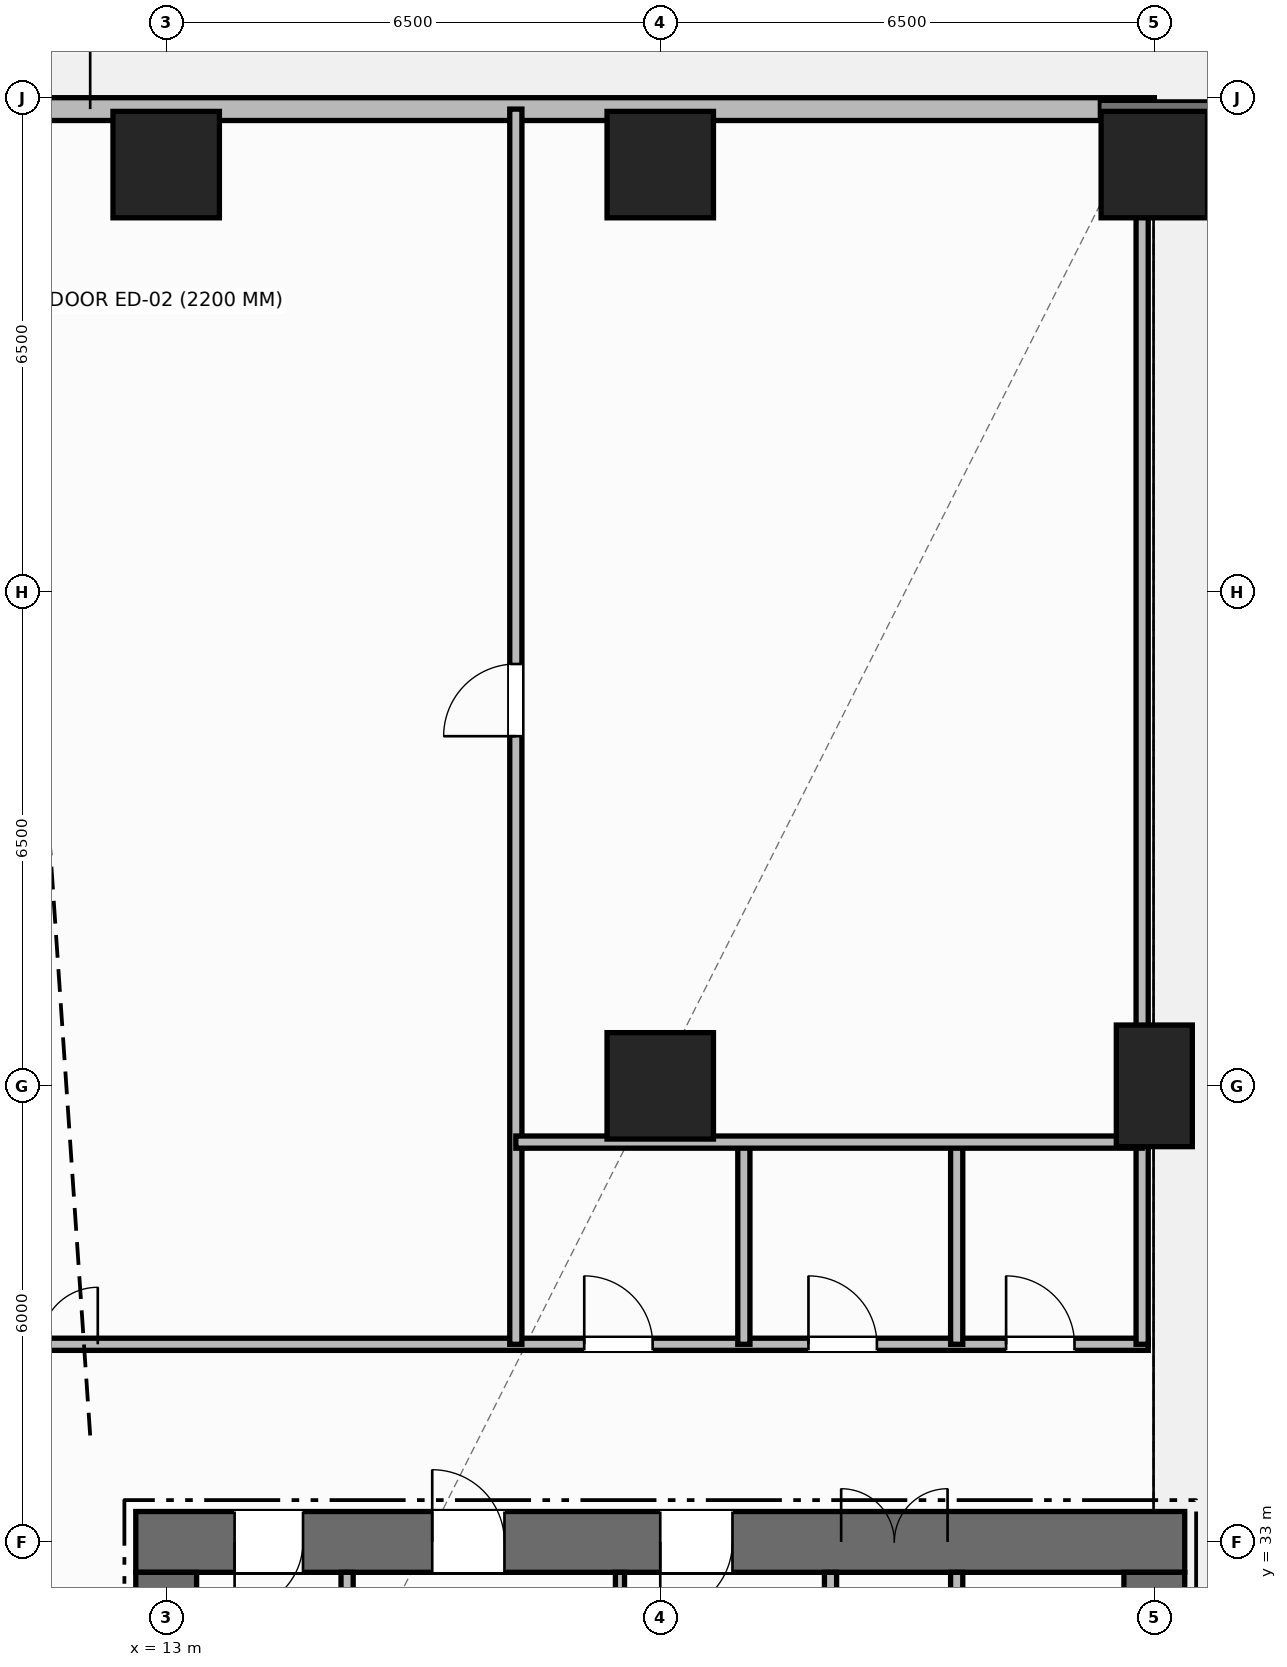
"""IFC4 building model, lengths in metres.
Left out: names, types, materials, properties, quantities, classifications, styles, units other than length and angle.
Written with IfcOpenShell. Run it as: python <this file> out.ifc"""

import sys

from ifc_helpers import new_model, si_unit, direction, frame, frame_2d, origin, origin_2d, place, context, subcontext, project, spatial, rectangle, extrude, element, fill, save


model = new_model("IFC4")
c1 = context("Model", 3, precision=1e-05, world=origin(), true_north=direction((0.0, 1.0)))
c2 = subcontext(c1, "Body", "Model", "MODEL_VIEW")
j1 = project(units=[si_unit("LENGTHUNIT", "METRE"), si_unit("PLANEANGLEUNIT", "RADIAN")], contexts=[c1])
p1 = place(None, origin())
s1 = spatial("IfcSite", under=j1, at=p1, CompositionType="ELEMENT")
p2 = place(p1, origin())
s2 = spatial("IfcBuilding", under=s1, at=p2, CompositionType="ELEMENT")
p3 = place(p2, origin())
s3 = spatial("IfcBuildingStorey", under=s2, at=p3, CompositionType="ELEMENT", Elevation=0.0)
p4 = place(p3, frame((12.6, 33.0, 0.0), z_axis=(0.0, 0.0, 1.0), x_axis=(1.0, 0.0, 0.0)))
e1 = element("IfcWall", 1, at=p4, inside=s3, PredefinedType="SHEAR", context=c2, shape_type="SweptSolid", body=[
    extrude(rectangle(XDim=13.8, YDim=0.8, at=frame_2d((6.9, 0.0))), origin(), (0.0, 0.0, 1.0), 6.0),
])
p5 = place(p4, frame((1.3, 0.0, 0.0)))
e2 = element("IfcOpeningElement", 2, at=p5, cuts=e1, PredefinedType="OPENING", context=c2, shape_type="SweptSolid", body=[
    extrude(rectangle(XDim=0.9, YDim=2.15, at=frame_2d((0.45, 1.075))), frame((0.0, 0.41, 0.0), z_axis=(0.0, -1.0, 0.0), x_axis=(1.0, 0.0, 0.0)), (0.0, 0.0, 1.0), 0.82),
])
p6 = place(p4, frame((3.9, 0.0, 0.0)))
e3 = element("IfcOpeningElement", 3, at=p6, cuts=e1, PredefinedType="OPENING", context=c2, shape_type="SweptSolid", body=[
    extrude(rectangle(XDim=0.95, YDim=2.15, at=frame_2d((0.475, 1.075))), frame((0.0, 0.41, 0.0), z_axis=(0.0, -1.0, 0.0), x_axis=(1.0, 0.0, 0.0)), (0.0, 0.0, 1.0), 0.82),
])
p7 = place(p4, frame((6.9, 0.0, 0.0)))
e4 = element("IfcOpeningElement", 4, at=p7, cuts=e1, PredefinedType="OPENING", context=c2, shape_type="SweptSolid", body=[
    extrude(rectangle(XDim=0.95, YDim=2.15, at=frame_2d((0.475, 1.075))), frame((0.0, 0.41, 0.0), z_axis=(0.0, -1.0, 0.0), x_axis=(1.0, 0.0, 0.0)), (0.0, 0.0, 1.0), 0.82),
])
p8 = place(p4, frame((9.28, 0.0, 0.0)))
e5 = element("IfcOpeningElement", 5, at=p8, cuts=e1, PredefinedType="OPENING", context=c2, shape_type="SweptSolid", body=[
    extrude(rectangle(XDim=1.4, YDim=2.2, at=frame_2d((0.7, 1.1))), frame((0.0, 0.41, 0.0), z_axis=(0.0, -1.0, 0.0), x_axis=(1.0, 0.0, 0.0)), (0.0, 0.0, 1.0), 0.82),
])
p9 = place(p3, frame((13.0, 19.4, 0.0), z_axis=(0.0, 0.0, 1.0), x_axis=(0.0, 1.0, 0.0)))
e6 = element("IfcWall", 6, at=p9, inside=s3, PredefinedType="SHEAR", context=c2, shape_type="SweptSolid", body=[
    extrude(rectangle(XDim=13.2, YDim=0.8, at=frame_2d((6.6, 0.0))), origin(), (0.0, 0.0, 1.0), 6.0),
])
p10 = place(p9, frame((4.65, 0.0, 0.0)))
e7 = element("IfcOpeningElement", 7, at=p10, cuts=e6, PredefinedType="OPENING", context=c2, shape_type="SweptSolid", body=[
    extrude(rectangle(XDim=1.4, YDim=2.2, at=frame_2d((0.7, 1.1))), frame((0.0, 0.41, 0.0), z_axis=(0.0, -1.0, 0.0), x_axis=(1.0, 0.0, 0.0)), (0.0, 0.0, 1.0), 0.82),
])
p11 = place(p3, frame((26.0, 19.4, 0.0), z_axis=(0.0, 0.0, 1.0), x_axis=(0.0, 1.0, 0.0)))
e8 = element("IfcWall", 8, at=p11, inside=s3, PredefinedType="SHEAR", context=c2, shape_type="SweptSolid", body=[
    extrude(rectangle(XDim=13.2, YDim=0.8, at=frame_2d((6.6, 0.0))), origin(), (0.0, 0.0, 1.0), 6.0),
])
p12 = place(p3, frame((19.5, 39.0, 0.0), z_axis=(0.0, 0.0, 1.0), x_axis=(1.0, 0.0, 0.0)))
e9 = element("IfcColumn", 9, at=p12, inside=s3, PredefinedType="COLUMN", context=c2, shape_type="SweptSolid", body=[
    extrude(rectangle(XDim=1.4, YDim=1.4, at=origin_2d()), origin(), (0.0, 0.0, 1.0), 6.0),
])
p13 = place(p3, frame((26.0, 39.0, 0.0), z_axis=(0.0, 0.0, 1.0), x_axis=(1.0, 0.0, 0.0)))
e10 = element("IfcColumn", 10, at=p13, inside=s3, PredefinedType="PILASTER", context=c2, shape_type="SweptSolid", body=[
    extrude(rectangle(XDim=1.0, YDim=1.6, at=origin_2d()), origin(), (0.0, 0.0, 1.0), 6.0),
])
for number, where, z_axis, x_axis in (
    (11, (13.0, 51.12, 0.0), (0.0, 0.0, 1.0), (1.0, 0.0, 0.0)),
    (12, (19.5, 51.12, 0.0), (0.0, 0.0, 1.0), (1.0, 0.0, 0.0)),
    (13, (26.0, 51.12, 0.0), (0.0, 0.0, 1.0), (1.0, 0.0, 0.0)),
):
    element("IfcColumn", number, at=place(p3, frame(where, z_axis=z_axis, x_axis=x_axis)), inside=s3, PredefinedType="COLUMN", context=c2, shape_type="SweptSolid", body=[
        extrude(rectangle(XDim=1.4, YDim=1.4, at=origin_2d()), origin(), (0.0, 0.0, 1.0), 6.0),
    ])
p14 = place(p3, frame((3.0, 51.85, 0.0), z_axis=(0.0, 0.0, 1.0), x_axis=(1.0, 0.0, 0.0)))
e14 = element("IfcWall", 14, at=p14, inside=s3, PredefinedType="STANDARD", context=c2, shape_type="SweptSolid", body=[
    extrude(rectangle(XDim=23.0, YDim=0.3, at=frame_2d((11.5, 0.0))), origin(), (0.0, 0.0, 1.0), 5.72),
])
p15 = place(p14, frame((6.8, 0.0, 0.0)))
e15 = element("IfcOpeningElement", 15, at=p15, cuts=e14, PredefinedType="OPENING", context=c2, shape_type="SweptSolid", body=[
    extrude(rectangle(XDim=2.2, YDim=2.4, at=frame_2d((1.1, 1.2))), frame((0.0, 0.16, 0.0), z_axis=(0.0, -1.0, 0.0), x_axis=(1.0, 0.0, 0.0)), (0.0, 0.0, 1.0), 0.32),
])
p16 = place(p3, frame((15.38, 26.56, 0.0), z_axis=(0.0, 0.0, 1.0), x_axis=(0.0, 1.0, 0.0)))
e16 = element("IfcWall", 16, at=p16, inside=s3, PredefinedType="STANDARD", context=c2, shape_type="SweptSolid", body=[
    extrude(rectangle(XDim=6.04, YDim=0.16, at=frame_2d((3.02, 0.0))), origin(), (0.0, 0.0, 1.0), 5.72),
])
p17 = place(p3, frame((18.97, 26.56, 0.0), z_axis=(0.0, 0.0, 1.0), x_axis=(0.0, 1.0, 0.0)))
e17 = element("IfcWall", 17, at=p17, inside=s3, PredefinedType="PARTITIONING", context=c2, shape_type="SweptSolid", body=[
    extrude(rectangle(XDim=6.04, YDim=0.12, at=frame_2d((3.02, 0.0))), origin(), (0.0, 0.0, 1.0), 5.72),
])
p18 = place(p3, frame((21.74, 26.56, 0.0), z_axis=(0.0, 0.0, 1.0), x_axis=(0.0, 1.0, 0.0)))
e18 = element("IfcWall", 18, at=p18, inside=s3, PredefinedType="STANDARD", context=c2, shape_type="SweptSolid", body=[
    extrude(rectangle(XDim=6.04, YDim=0.16, at=frame_2d((3.02, 0.0))), origin(), (0.0, 0.0, 1.0), 5.72),
])
p19 = place(p3, frame((23.4, 19.4, 0.0), z_axis=(0.0, 0.0, 1.0), x_axis=(0.0, 1.0, 0.0)))
e19 = element("IfcWall", 19, at=p19, inside=s3, PredefinedType="STANDARD", context=c2, shape_type="SweptSolid", body=[
    extrude(rectangle(XDim=13.2, YDim=0.16, at=frame_2d((6.6, 0.0))), origin(), (0.0, 0.0, 1.0), 5.72),
])
p20 = place(p19, frame((0.55, 0.0, 0.0)))
e20 = element("IfcOpeningElement", 20, at=p20, cuts=e19, PredefinedType="OPENING", context=c2, shape_type="SweptSolid", body=[
    extrude(rectangle(XDim=1.1, YDim=2.2, at=frame_2d((0.55, 1.1))), frame((0.0, 0.09, 0.0), z_axis=(0.0, -1.0, 0.0), x_axis=(1.0, 0.0, 0.0)), (0.0, 0.0, 1.0), 0.18),
])
p21 = place(p19, frame((2.7, 0.0, 0.0)))
e21 = element("IfcOpeningElement", 21, at=p21, cuts=e19, PredefinedType="OPENING", context=c2, shape_type="SweptSolid", body=[
    extrude(rectangle(XDim=1.1, YDim=2.2, at=frame_2d((0.55, 1.1))), frame((0.0, 0.09, 0.0), z_axis=(0.0, -1.0, 0.0), x_axis=(1.0, 0.0, 0.0)), (0.0, 0.0, 1.0), 0.18),
])
p22 = place(p19, frame((4.9, 0.0, 0.0)))
e22 = element("IfcOpeningElement", 22, at=p22, cuts=e19, PredefinedType="OPENING", context=c2, shape_type="SweptSolid", body=[
    extrude(rectangle(XDim=1.1, YDim=2.2, at=frame_2d((0.55, 1.1))), frame((0.0, 0.09, 0.0), z_axis=(0.0, -1.0, 0.0), x_axis=(1.0, 0.0, 0.0)), (0.0, 0.0, 1.0), 0.18),
])
p23 = place(p19, frame((7.05, 0.0, 0.0)))
e23 = element("IfcOpeningElement", 23, at=p23, cuts=e19, PredefinedType="OPENING", context=c2, shape_type="SweptSolid", body=[
    extrude(rectangle(XDim=1.1, YDim=2.2, at=frame_2d((0.55, 1.1))), frame((0.0, 0.09, 0.0), z_axis=(0.0, -1.0, 0.0), x_axis=(1.0, 0.0, 0.0)), (0.0, 0.0, 1.0), 0.18),
])
p24 = place(p19, frame((9.2, 0.0, 0.0)))
e24 = element("IfcOpeningElement", 24, at=p24, cuts=e19, PredefinedType="OPENING", context=c2, shape_type="SweptSolid", body=[
    extrude(rectangle(XDim=1.1, YDim=2.2, at=frame_2d((0.55, 1.1))), frame((0.0, 0.09, 0.0), z_axis=(0.0, -1.0, 0.0), x_axis=(1.0, 0.0, 0.0)), (0.0, 0.0, 1.0), 0.18),
])
p25 = place(p19, frame((11.4, 0.0, 0.0)))
e25 = element("IfcOpeningElement", 25, at=p25, cuts=e19, PredefinedType="OPENING", context=c2, shape_type="SweptSolid", body=[
    extrude(rectangle(XDim=1.1, YDim=2.2, at=frame_2d((0.55, 1.1))), frame((0.0, 0.09, 0.0), z_axis=(0.0, -1.0, 0.0), x_axis=(1.0, 0.0, 0.0)), (0.0, 0.0, 1.0), 0.18),
])
p26 = place(p3, frame((0.1, 35.6, 0.0), z_axis=(0.0, 0.0, 1.0), x_axis=(1.0, 0.0, 0.0)))
e26 = element("IfcWall", 26, at=p26, inside=s3, PredefinedType="STANDARD", context=c2, shape_type="SweptSolid", body=[
    extrude(rectangle(XDim=25.82, YDim=0.16, at=frame_2d((12.91, 0.0))), origin(), (0.0, 0.0, 1.0), 5.72),
])
p27 = place(p26, frame((10.5, 0.0, 0.0)))
e27 = element("IfcOpeningElement", 27, at=p27, cuts=e26, PredefinedType="OPENING", context=c2, shape_type="SweptSolid", body=[
    extrude(rectangle(XDim=1.5, YDim=2.2, at=frame_2d((0.75, 1.1))), frame((0.0, 0.09, 0.0), z_axis=(0.0, -1.0, 0.0), x_axis=(1.0, 0.0, 0.0)), (0.0, 0.0, 1.0), 0.18),
])
p28 = place(p26, frame((18.4, 0.0, 0.0)))
e28 = element("IfcOpeningElement", 28, at=p28, cuts=e26, PredefinedType="OPENING", context=c2, shape_type="SweptSolid", body=[
    extrude(rectangle(XDim=0.9, YDim=2.15, at=frame_2d((0.45, 1.075))), frame((0.0, 0.09, 0.0), z_axis=(0.0, -1.0, 0.0), x_axis=(1.0, 0.0, 0.0)), (0.0, 0.0, 1.0), 0.18),
])
p29 = place(p26, frame((21.35, 0.0, 0.0)))
e29 = element("IfcOpeningElement", 29, at=p29, cuts=e26, PredefinedType="OPENING", context=c2, shape_type="SweptSolid", body=[
    extrude(rectangle(XDim=0.9, YDim=2.15, at=frame_2d((0.45, 1.075))), frame((0.0, 0.09, 0.0), z_axis=(0.0, -1.0, 0.0), x_axis=(1.0, 0.0, 0.0)), (0.0, 0.0, 1.0), 0.18),
])
p30 = place(p26, frame((23.95, 0.0, 0.0)))
e30 = element("IfcOpeningElement", 30, at=p30, cuts=e26, PredefinedType="OPENING", context=c2, shape_type="SweptSolid", body=[
    extrude(rectangle(XDim=0.9, YDim=2.15, at=frame_2d((0.45, 1.075))), frame((0.0, 0.09, 0.0), z_axis=(0.0, -1.0, 0.0), x_axis=(1.0, 0.0, 0.0)), (0.0, 0.0, 1.0), 0.18),
])
p31 = place(p3, frame((25.84, 35.6, 0.0), z_axis=(0.0, 0.0, 1.0), x_axis=(0.0, 1.0, 0.0)))
e31 = element("IfcWall", 31, at=p31, inside=s3, PredefinedType="STANDARD", context=c2, shape_type="SweptSolid", body=[
    extrude(rectangle(XDim=16.25, YDim=0.16, at=frame_2d((8.125, 0.0))), origin(), (0.0, 0.0, 1.0), 4.92),
])
p32 = place(p3, frame((17.6, 35.6, 0.0), z_axis=(0.0, 0.0, 1.0), x_axis=(0.0, 1.0, 0.0)))
e32 = element("IfcWall", 32, at=p32, inside=s3, PredefinedType="STANDARD", context=c2, shape_type="SweptSolid", body=[
    extrude(rectangle(XDim=16.25, YDim=0.16, at=frame_2d((8.125, 0.0))), origin(), (0.0, 0.0, 1.0), 5.72),
])
p33 = place(p32, frame((8.0, 0.0, 0.0)))
e33 = element("IfcOpeningElement", 33, at=p33, cuts=e32, PredefinedType="OPENING", context=c2, shape_type="SweptSolid", body=[
    extrude(rectangle(XDim=0.95, YDim=2.15, at=frame_2d((0.475, 1.075))), frame((0.0, 0.09, 0.0), z_axis=(0.0, -1.0, 0.0), x_axis=(1.0, 0.0, 0.0)), (0.0, 0.0, 1.0), 0.18),
])
for number, where, z_axis, x_axis in (
    (34, (20.6, 35.6, 0.0), (0.0, 0.0, 1.0), (0.0, 1.0, 0.0)),
    (35, (23.4, 35.6, 0.0), (0.0, 0.0, 1.0), (0.0, 1.0, 0.0)),
):
    element("IfcWall", number, at=place(p3, frame(where, z_axis=z_axis, x_axis=x_axis)), inside=s3, PredefinedType="STANDARD", context=c2, shape_type="SweptSolid", body=[
        extrude(rectangle(XDim=2.66, YDim=0.16, at=frame_2d((1.33, 0.0))), origin(), (0.0, 0.0, 1.0), 5.72),
    ])
p34 = place(p3, frame((17.6, 38.26, 0.0), z_axis=(0.0, 0.0, 1.0), x_axis=(1.0, 0.0, 0.0)))
e36 = element("IfcWall", 36, at=p34, inside=s3, PredefinedType="STANDARD", context=c2, shape_type="SweptSolid", body=[
    extrude(rectangle(XDim=8.24, YDim=0.16, at=frame_2d((4.12, 0.0))), origin(), (0.0, 0.0, 1.0), 5.72),
])
p35 = place(p15, origin())
e37 = element("IfcDoor", 37, at=p35, inside=s3, OperationType="DOUBLE_DOOR_SINGLE_SWING", PredefinedType="DOOR", context=c2, shape_type="SweptSolid", body=[
    extrude(rectangle(XDim=2.2, YDim=2.4, at=frame_2d((1.1, 1.2))), frame((0.0, 0.025, 0.0), z_axis=(0.0, -1.0, 0.0), x_axis=(1.0, 0.0, 0.0)), (0.0, 0.0, 1.0), 0.05),
])
fill(e15, e37)
p36 = place(p5, origin())
e38 = element("IfcDoor", 38, at=p36, inside=s3, OperationType="SINGLE_SWING_RIGHT", PredefinedType="DOOR", context=c2, shape_type="SweptSolid", body=[
    extrude(rectangle(XDim=0.9, YDim=2.15, at=frame_2d((0.45, 1.075))), frame((0.0, -0.075, 0.0), z_axis=(0.0, -1.0, 0.0), x_axis=(1.0, 0.0, 0.0)), (0.0, 0.0, 1.0), 0.05),
])
fill(e2, e38)
p37 = place(p6, origin())
e39 = element("IfcDoor", 39, at=p37, inside=s3, OperationType="SINGLE_SWING_LEFT", PredefinedType="DOOR", context=c2, shape_type="SweptSolid", body=[
    extrude(rectangle(XDim=0.95, YDim=2.15, at=frame_2d((0.475, 1.075))), frame((0.0, -0.075, 0.0), z_axis=(0.0, -1.0, 0.0), x_axis=(1.0, 0.0, 0.0)), (0.0, 0.0, 1.0), 0.05),
])
fill(e3, e39)
p38 = place(p7, origin())
e40 = element("IfcDoor", 40, at=p38, inside=s3, OperationType="SINGLE_SWING_RIGHT", PredefinedType="DOOR", context=c2, shape_type="SweptSolid", body=[
    extrude(rectangle(XDim=0.95, YDim=2.15, at=frame_2d((0.475, 1.075))), frame((0.0, -0.075, 0.0), z_axis=(0.0, -1.0, 0.0), x_axis=(1.0, 0.0, 0.0)), (0.0, 0.0, 1.0), 0.05),
])
fill(e4, e40)
p39 = place(p8, origin())
e41 = element("IfcDoor", 41, at=p39, inside=s3, OperationType="DOUBLE_DOOR_SINGLE_SWING", PredefinedType="DOOR", context=c2, shape_type="SweptSolid", body=[
    extrude(rectangle(XDim=1.4, YDim=2.2, at=frame_2d((0.7, 1.1))), frame((0.0, -0.075, 0.0), z_axis=(0.0, -1.0, 0.0), x_axis=(1.0, 0.0, 0.0)), (0.0, 0.0, 1.0), 0.05),
])
fill(e5, e41)
p40 = place(p27, origin())
e42 = element("IfcDoor", 42, at=p40, inside=s3, OperationType="DOUBLE_DOOR_SINGLE_SWING", PredefinedType="DOOR", context=c2, shape_type="SweptSolid", body=[
    extrude(rectangle(XDim=1.5, YDim=2.2, at=frame_2d((0.75, 1.1))), frame((0.0, 0.025, 0.0), z_axis=(0.0, -1.0, 0.0), x_axis=(1.0, 0.0, 0.0)), (0.0, 0.0, 1.0), 0.05),
])
fill(e27, e42)
p41 = place(p28, origin())
e43 = element("IfcDoor", 43, at=p41, inside=s3, OperationType="SINGLE_SWING_LEFT", PredefinedType="DOOR", context=c2, shape_type="SweptSolid", body=[
    extrude(rectangle(XDim=0.9, YDim=2.15, at=frame_2d((0.45, 1.075))), frame((0.0, 0.025, 0.0), z_axis=(0.0, -1.0, 0.0), x_axis=(1.0, 0.0, 0.0)), (0.0, 0.0, 1.0), 0.05),
])
fill(e28, e43)
p42 = place(p29, origin())
e44 = element("IfcDoor", 44, at=p42, inside=s3, OperationType="SINGLE_SWING_LEFT", PredefinedType="DOOR", context=c2, shape_type="SweptSolid", body=[
    extrude(rectangle(XDim=0.9, YDim=2.15, at=frame_2d((0.45, 1.075))), frame((0.0, 0.025, 0.0), z_axis=(0.0, -1.0, 0.0), x_axis=(1.0, 0.0, 0.0)), (0.0, 0.0, 1.0), 0.05),
])
fill(e29, e44)
p43 = place(p30, origin())
e45 = element("IfcDoor", 45, at=p43, inside=s3, OperationType="SINGLE_SWING_LEFT", PredefinedType="DOOR", context=c2, shape_type="SweptSolid", body=[
    extrude(rectangle(XDim=0.9, YDim=2.15, at=frame_2d((0.45, 1.075))), frame((0.0, 0.025, 0.0), z_axis=(0.0, -1.0, 0.0), x_axis=(1.0, 0.0, 0.0)), (0.0, 0.0, 1.0), 0.05),
])
fill(e30, e45)
p44 = place(p33, origin())
e46 = element("IfcDoor", 46, at=p44, inside=s3, OperationType="SINGLE_SWING_LEFT", PredefinedType="DOOR", context=c2, shape_type="SweptSolid", body=[
    extrude(rectangle(XDim=0.95, YDim=2.15, at=frame_2d((0.475, 1.075))), frame((0.0, 0.025, 0.0), z_axis=(0.0, -1.0, 0.0), x_axis=(1.0, 0.0, 0.0)), (0.0, 0.0, 1.0), 0.05),
])
fill(e33, e46)
save(model, sys.argv[1])
